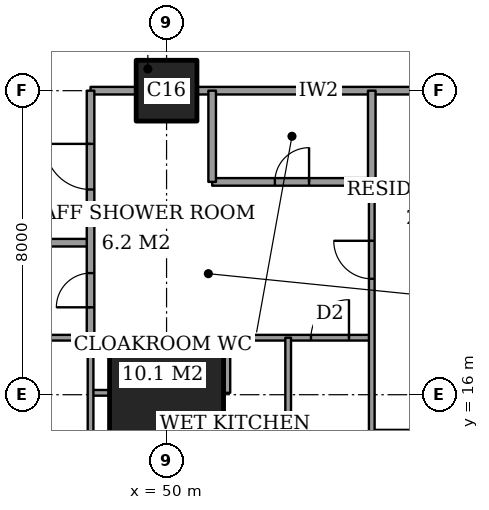
"""IFC4 building model, lengths in metres.
Left out: names, types, materials, properties, quantities, classifications, styles, units other than length and angle.
Written with IfcOpenShell. Run it as: python <this file> out.ifc"""

import sys

from ifc_helpers import new_model, si_unit, direction, frame, frame_2d, origin, origin_2d, place, context, subcontext, project, spatial, rectangle, extrude, element, fill, save


model = new_model("IFC4")
c1 = context("Model", 3, precision=1e-05, world=origin(), true_north=direction((0.0, 1.0)))
c2 = subcontext(c1, "Body", "Model", "MODEL_VIEW")
j1 = project(units=[si_unit("LENGTHUNIT", "METRE"), si_unit("PLANEANGLEUNIT", "RADIAN")], contexts=[c1])
p1 = place(None, origin())
s1 = spatial("IfcSite", under=j1, at=p1, CompositionType="ELEMENT")
p2 = place(p1, origin())
s2 = spatial("IfcBuilding", under=s1, at=p2, CompositionType="ELEMENT")
p3 = place(p2, frame((0.0, 0.0, 234.0)))
s3 = spatial("IfcBuildingStorey", under=s2, at=p3, CompositionType="ELEMENT", Elevation=234.0)
p4 = place(p3, frame((50.0, 16.0, 0.0), z_axis=(0.0, 0.0, 1.0), x_axis=(1.0, 0.0, 0.0)))
e1 = element("IfcColumn", 1, at=p4, inside=s3, PredefinedType="COLUMN", context=c2, shape_type="SweptSolid", body=[
    extrude(rectangle(XDim=3.0, YDim=2.4, at=origin_2d()), origin(), (0.0, 0.0, 1.0), 3.6),
])
p5 = place(p3, frame((50.0, 24.0, 0.0), z_axis=(0.0, 0.0, 1.0), x_axis=(1.0, 0.0, 0.0)))
e2 = element("IfcColumn", 2, at=p5, inside=s3, PredefinedType="COLUMN", context=c2, shape_type="SweptSolid", body=[
    extrude(rectangle(XDim=1.6, YDim=1.6, at=origin_2d()), origin(), (0.0, 0.0, 1.0), 3.6),
])
p6 = place(p3, frame((55.4, 15.0, 0.0), z_axis=(0.0, 0.0, 1.0), x_axis=(1.0, 0.0, 0.0)))
e3 = element("IfcWall", 3, at=p6, inside=s3, PredefinedType="PARTITIONING", context=c2, shape_type="SweptSolid", body=[
    extrude(rectangle(XDim=1.1, YDim=0.15, at=frame_2d((0.55, 0.0))), origin(), (0.0, 0.0, 1.0), 3.35),
])
p7 = place(p3, frame((48.0, 16.05, 0.0), z_axis=(0.0, 0.0, 1.0), x_axis=(1.0, 0.0, 0.0)))
e4 = element("IfcWall", 4, at=p7, inside=s3, PredefinedType="PARTITIONING", context=c2, shape_type="SweptSolid", body=[
    extrude(rectangle(XDim=0.5, YDim=0.15, at=frame_2d((0.25, 0.0))), origin(), (0.0, 0.0, 1.0), 2.634),
])
p8 = place(p3, frame((42.0, 17.5, 0.0), z_axis=(0.0, 0.0, 1.0), x_axis=(1.0, 0.0, 0.0)))
e5 = element("IfcWall", 5, at=p8, inside=s3, PredefinedType="PARTITIONING", context=c2, shape_type="SweptSolid", body=[
    extrude(rectangle(XDim=6.0, YDim=0.15, at=frame_2d((3.0, 0.0))), origin(), (0.0, 0.0, 1.0), 3.35),
])
p9 = place(p3, frame((51.6, 17.5, 0.0), z_axis=(0.0, 0.0, 1.0), x_axis=(1.0, 0.0, 0.0)))
e6 = element("IfcWall", 6, at=p9, inside=s3, PredefinedType="PARTITIONING", context=c2, shape_type="SweptSolid", body=[
    extrude(rectangle(XDim=3.8, YDim=0.15, at=frame_2d((1.9, 0.0))), origin(), (0.0, 0.0, 1.0), 3.35),
])
p10 = place(p9, frame((2.2, 0.0, 0.0)))
e7 = element("IfcOpeningElement", 7, at=p10, cuts=e6, PredefinedType="OPENING", context=c2, shape_type="SweptSolid", body=[
    extrude(rectangle(XDim=1.0, YDim=2.1, at=frame_2d((0.5, 1.05))), frame((0.0, 0.085, 0.0), z_axis=(0.0, -1.0, 0.0), x_axis=(1.0, 0.0, 0.0)), (0.0, 0.0, 1.0), 0.17),
])
p11 = place(p3, frame((42.0, 20.0, 0.0), z_axis=(0.0, 0.0, 1.0), x_axis=(1.0, 0.0, 0.0)))
e8 = element("IfcWall", 8, at=p11, inside=s3, PredefinedType="PARTITIONING", context=c2, shape_type="SweptSolid", body=[
    extrude(rectangle(XDim=6.0, YDim=0.2, at=frame_2d((3.0, 0.0))), origin(), (0.0, 0.0, 1.0), 3.35),
])
p12 = place(p3, frame((51.2, 21.6, 0.0), z_axis=(0.0, 0.0, 1.0), x_axis=(1.0, 0.0, 0.0)))
e9 = element("IfcWall", 9, at=p12, inside=s3, PredefinedType="PARTITIONING", context=c2, shape_type="SweptSolid", body=[
    extrude(rectangle(XDim=4.2, YDim=0.2, at=frame_2d((2.1, 0.0))), origin(), (0.0, 0.0, 1.0), 3.35),
])
p13 = place(p12, frame((1.65, 0.0, 0.0)))
e10 = element("IfcOpeningElement", 10, at=p13, cuts=e9, PredefinedType="OPENING", context=c2, shape_type="SweptSolid", body=[
    extrude(rectangle(XDim=0.9, YDim=2.1, at=frame_2d((0.45, 1.05))), frame((0.0, 0.11, 0.0), z_axis=(0.0, -1.0, 0.0), x_axis=(1.0, 0.0, 0.0)), (0.0, 0.0, 1.0), 0.22),
])
p14 = place(p3, frame((48.0, 24.0, 0.0), z_axis=(0.0, 0.0, 1.0), x_axis=(1.0, 0.0, 0.0)))
e11 = element("IfcWall", 11, at=p14, inside=s3, PredefinedType="PARTITIONING", context=c2, shape_type="SweptSolid", body=[
    extrude(rectangle(XDim=1.2, YDim=0.2, at=frame_2d((0.6, 0.0))), origin(), (0.0, 0.0, 1.0), 3.35),
])
p15 = place(p3, frame((50.8, 24.0, 0.0), z_axis=(0.0, 0.0, 1.0), x_axis=(1.0, 0.0, 0.0)))
e12 = element("IfcWall", 12, at=p15, inside=s3, PredefinedType="PARTITIONING", context=c2, shape_type="SweptSolid", body=[
    extrude(rectangle(XDim=6.4, YDim=0.2, at=frame_2d((3.2, 0.0))), origin(), (0.0, 0.0, 1.0), 3.35),
])
p16 = place(p3, frame((48.0, 17.5, 0.0), z_axis=(0.0, 0.0, 1.0), x_axis=(0.0, 1.0, 0.0)))
e13 = element("IfcWall", 13, at=p16, inside=s3, PredefinedType="PARTITIONING", context=c2, shape_type="SweptSolid", body=[
    extrude(rectangle(XDim=6.5, YDim=0.2, at=frame_2d((3.25, 0.0))), origin(), (0.0, 0.0, 1.0), 3.35),
])
p17 = place(p16, frame((3.9, 0.0, 0.0)))
e14 = element("IfcOpeningElement", 14, at=p17, cuts=e13, PredefinedType="OPENING", context=c2, shape_type="SweptSolid", body=[
    extrude(rectangle(XDim=1.2, YDim=2.4, at=frame_2d((0.6, 1.2))), frame((0.0, 0.11, 0.0), z_axis=(0.0, -1.0, 0.0), x_axis=(1.0, 0.0, 0.0)), (0.0, 0.0, 1.0), 0.22),
])
p18 = place(p16, frame((0.8, 0.0, 0.0)))
e15 = element("IfcOpeningElement", 15, at=p18, cuts=e13, PredefinedType="OPENING", context=c2, shape_type="SweptSolid", body=[
    extrude(rectangle(XDim=0.9, YDim=2.1, at=frame_2d((0.45, 1.05))), frame((0.0, 0.11, 0.0), z_axis=(0.0, -1.0, 0.0), x_axis=(1.0, 0.0, 0.0)), (0.0, 0.0, 1.0), 0.22),
])
p19 = place(p3, frame((48.0, 11.0, 0.0), z_axis=(0.0, 0.0, 1.0), x_axis=(0.0, 1.0, 0.0)))
e16 = element("IfcWall", 16, at=p19, inside=s3, PredefinedType="PARTITIONING", context=c2, shape_type="SweptSolid", body=[
    extrude(rectangle(XDim=6.5, YDim=0.15, at=frame_2d((3.25, 0.0))), origin(), (0.0, 0.0, 1.0), 3.35),
])
p20 = place(p3, frame((51.2, 21.6, 0.0), z_axis=(0.0, 0.0, 1.0), x_axis=(0.0, 1.0, 0.0)))
e17 = element("IfcWall", 17, at=p20, inside=s3, PredefinedType="PARTITIONING", context=c2, shape_type="SweptSolid", body=[
    extrude(rectangle(XDim=2.4, YDim=0.2, at=frame_2d((1.2, 0.0))), origin(), (0.0, 0.0, 1.0), 3.35),
])
p21 = place(p3, frame((51.6, 16.05, 0.0), z_axis=(0.0, 0.0, 1.0), x_axis=(0.0, 1.0, 0.0)))
e18 = element("IfcWall", 18, at=p21, inside=s3, PredefinedType="PARTITIONING", context=c2, shape_type="SweptSolid", body=[
    extrude(rectangle(XDim=1.45, YDim=0.15, at=frame_2d((0.725, 0.0))), origin(), (0.0, 0.0, 1.0), 3.35),
])
p22 = place(p3, frame((53.2, 11.0, 0.0), z_axis=(0.0, 0.0, 1.0), x_axis=(0.0, 1.0, 0.0)))
e19 = element("IfcWall", 19, at=p22, inside=s3, PredefinedType="PARTITIONING", context=c2, shape_type="SweptSolid", body=[
    extrude(rectangle(XDim=6.5, YDim=0.15, at=frame_2d((3.25, 0.0))), origin(), (0.0, 0.0, 1.0), 3.35),
])
p23 = place(p3, frame((55.4, 21.6, 0.0), z_axis=(0.0, 0.0, 1.0), x_axis=(0.0, 1.0, 0.0)))
e20 = element("IfcWall", 20, at=p23, inside=s3, PredefinedType="PARTITIONING", context=c2, shape_type="SweptSolid", body=[
    extrude(rectangle(XDim=2.4, YDim=0.2, at=frame_2d((1.2, 0.0))), origin(), (0.0, 0.0, 1.0), 3.35),
])
p24 = place(p3, frame((55.4, 11.0, 0.0), z_axis=(0.0, 0.0, 1.0), x_axis=(0.0, 1.0, 0.0)))
e21 = element("IfcWall", 21, at=p24, inside=s3, PredefinedType="PARTITIONING", context=c2, shape_type="SweptSolid", body=[
    extrude(rectangle(XDim=10.6, YDim=0.15, at=frame_2d((5.3, 0.0))), origin(), (0.0, 0.0, 1.0), 3.35),
])
p25 = place(p24, frame((8.05, 0.0, 0.0)))
e22 = element("IfcOpeningElement", 22, at=p25, cuts=e21, PredefinedType="OPENING", context=c2, shape_type="SweptSolid", body=[
    extrude(rectangle(XDim=1.0, YDim=2.1, at=frame_2d((0.5, 1.05))), frame((0.0, 0.085, 0.0), z_axis=(0.0, -1.0, 0.0), x_axis=(1.0, 0.0, 0.0)), (0.0, 0.0, 1.0), 0.17),
])
p26 = place(p25, origin())
e23 = element("IfcDoor", 23, at=p26, inside=s3, OperationType="SINGLE_SWING_LEFT", PredefinedType="DOOR", context=c2, shape_type="SweptSolid", body=[
    extrude(rectangle(XDim=1.0, YDim=2.1, at=frame_2d((0.5, 1.05))), frame((0.0, 0.025, 0.0), z_axis=(0.0, -1.0, 0.0), x_axis=(1.0, 0.0, 0.0)), (0.0, 0.0, 1.0), 0.05),
])
fill(e22, e23)
p27 = place(p13, origin())
e24 = element("IfcDoor", 24, at=p27, inside=s3, OperationType="SINGLE_SWING_LEFT", PredefinedType="DOOR", context=c2, shape_type="SweptSolid", body=[
    extrude(rectangle(XDim=0.9, YDim=2.1, at=frame_2d((0.45, 1.05))), frame((0.0, 0.025, 0.0), z_axis=(0.0, -1.0, 0.0), x_axis=(1.0, 0.0, 0.0)), (0.0, 0.0, 1.0), 0.05),
])
fill(e10, e24)
p28 = place(p17, origin())
e25 = element("IfcDoor", 25, at=p28, inside=s3, OperationType="SINGLE_SWING_LEFT", PredefinedType="DOOR", context=c2, shape_type="SweptSolid", body=[
    extrude(rectangle(XDim=1.2, YDim=2.4, at=frame_2d((0.6, 1.2))), frame((0.0, 0.025, 0.0), z_axis=(0.0, -1.0, 0.0), x_axis=(1.0, 0.0, 0.0)), (0.0, 0.0, 1.0), 0.05),
])
fill(e14, e25)
p29 = place(p10, origin())
e26 = element("IfcDoor", 26, at=p29, inside=s3, OperationType="SINGLE_SWING_LEFT", PredefinedType="DOOR", context=c2, shape_type="SweptSolid", body=[
    extrude(rectangle(XDim=1.0, YDim=2.1, at=frame_2d((0.5, 1.05))), frame((0.0, 0.025, 0.0), z_axis=(0.0, -1.0, 0.0), x_axis=(1.0, 0.0, 0.0)), (0.0, 0.0, 1.0), 0.05),
])
fill(e7, e26)
p30 = place(p18, origin())
e27 = element("IfcDoor", 27, at=p30, inside=s3, OperationType="SINGLE_SWING_RIGHT", PredefinedType="DOOR", context=c2, shape_type="SweptSolid", body=[
    extrude(rectangle(XDim=0.9, YDim=2.1, at=frame_2d((0.45, 1.05))), frame((0.0, 0.025, 0.0), z_axis=(0.0, -1.0, 0.0), x_axis=(1.0, 0.0, 0.0)), (0.0, 0.0, 1.0), 0.05),
])
fill(e15, e27)
save(model, sys.argv[1])
